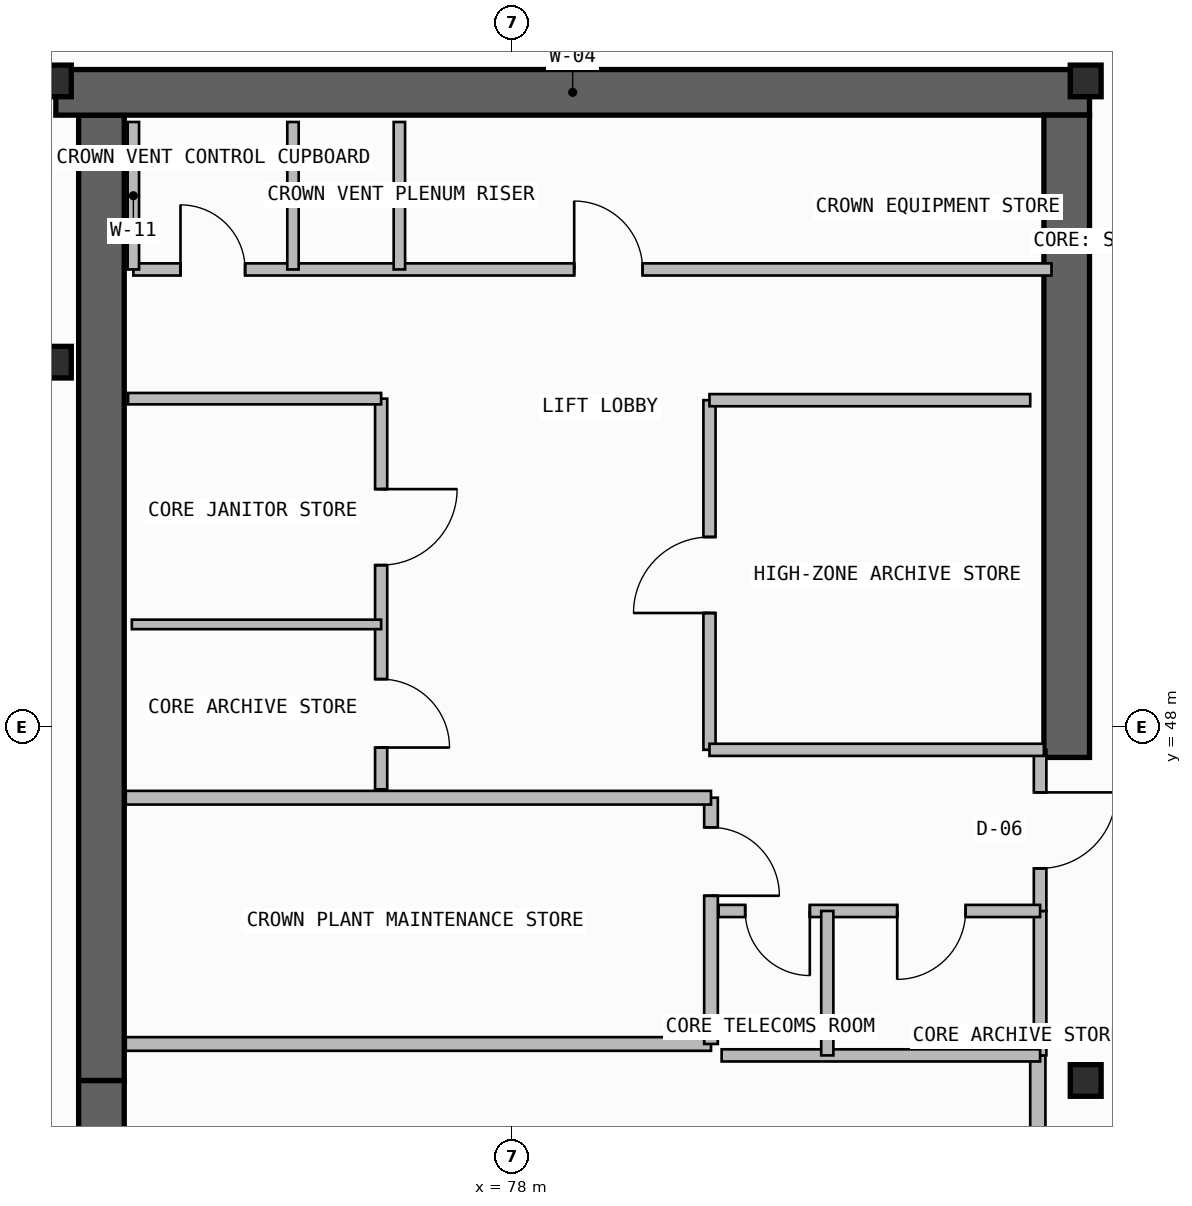
"""IFC4 building model, lengths in metres.
Left out: names, types, materials, properties, quantities, classifications, styles, units other than length and angle.
Written with IfcOpenShell. Run it as: python <this file> out.ifc"""

import sys

from ifc_helpers import new_model, si_unit, direction, frame, frame_2d, origin, origin_2d, place, context, subcontext, project, spatial, rectangle, i_section, extrude, element, fill, save


model = new_model("IFC4")
c1 = context("Model", 3, precision=1e-05, world=origin(), true_north=direction((0.0, 1.0)))
c2 = subcontext(c1, "Body", "Model", "MODEL_VIEW")
j1 = project(units=[si_unit("LENGTHUNIT", "METRE"), si_unit("PLANEANGLEUNIT", "RADIAN")], contexts=[c1])
p1 = place(None, origin())
s1 = spatial("IfcSite", under=j1, at=p1, CompositionType="ELEMENT")
p2 = place(p1, origin())
s2 = spatial("IfcBuilding", under=s1, at=p2, CompositionType="ELEMENT")
p3 = place(p2, frame((0.0, 0.0, 302.98)))
s3 = spatial("IfcBuildingStorey", under=s2, at=p3, CompositionType="ELEMENT", Elevation=302.98)
p4 = place(p3, frame((72.6, 35.5, -0.2), z_axis=(0.0, 0.0, 1.0), x_axis=(0.0, 1.0, 0.0)))
e1 = element("IfcWall", 1, at=p4, inside=s3, PredefinedType="SHEAR", context=c2, shape_type="SweptSolid", body=[
    extrude(rectangle(XDim=7.85, YDim=0.6, at=frame_2d((3.925, 0.0))), origin(), (0.0, 0.0, 1.0), 4.8),
])
p5 = place(p4, frame((1.45, 0.0, 0.2)))
e2 = element("IfcOpeningElement", 2, at=p5, cuts=e1, PredefinedType="OPENING", context=c2, shape_type="SweptSolid", body=[
    extrude(rectangle(XDim=1.2, YDim=2.2, at=frame_2d((0.6, 1.1))), frame((0.0, 0.31, 0.0), z_axis=(0.0, -1.0, 0.0), x_axis=(1.0, 0.0, 0.0)), (0.0, 0.0, 1.0), 0.62),
])
p6 = place(p3, frame((72.6, 43.35, -0.2), z_axis=(0.0, 0.0, 1.0), x_axis=(0.0, 1.0, 0.0)))
e3 = element("IfcWall", 3, at=p6, inside=s3, PredefinedType="SHEAR", context=c2, shape_type="SweptSolid", body=[
    extrude(rectangle(XDim=12.7, YDim=0.6, at=frame_2d((6.35, 0.0))), origin(), (0.0, 0.0, 1.0), 4.8),
])
p7 = place(p3, frame((72.0, 56.35, -0.2), z_axis=(0.0, 0.0, 1.0), x_axis=(1.0, 0.0, 0.0)))
e4 = element("IfcWall", 4, at=p7, inside=s3, PredefinedType="SHEAR", context=c2, shape_type="SweptSolid", body=[
    extrude(rectangle(XDim=13.6, YDim=0.6, at=frame_2d((6.8, 0.0))), origin(), (0.0, 0.0, 1.0), 4.8),
])
p8 = place(p3, frame((85.3, 47.6, -0.2), z_axis=(0.0, 0.0, 1.0), x_axis=(0.0, 1.0, 0.0)))
e5 = element("IfcWall", 5, at=p8, inside=s3, PredefinedType="SHEAR", context=c2, shape_type="SweptSolid", body=[
    extrude(rectangle(XDim=8.45, YDim=0.6, at=frame_2d((4.225, 0.0))), origin(), (0.0, 0.0, 1.0), 4.8),
])
for number, where, z_axis, x_axis in (
    (6, (85.55, 43.35, 0.0), (0.0, 0.0, 1.0), (1.0, 0.0, 0.0)),
    (7, (72.0, 52.8, 0.0), (0.0, 0.0, 1.0), (1.0, 0.0, 0.0)),
    (8, (72.0, 56.5, 0.0), (0.0, 0.0, 1.0), (1.0, 0.0, 0.0)),
    (9, (85.55, 56.5, 0.0), (0.0, 0.0, 1.0), (1.0, 0.0, 0.0)),
):
    element("IfcColumn", number, at=place(p3, frame(where, z_axis=z_axis, x_axis=x_axis)), inside=s3, PredefinedType="COLUMN", context=c2, shape_type="SweptSolid", body=[
        extrude(i_section(OverallWidth=0.406, OverallDepth=0.416, WebThickness=0.03, FlangeThickness=0.048, FilletRadius=0.015, at=origin_2d()), origin(), (0.0, 0.0, 1.0), 4.8),
    ])
p9 = place(p3, frame((84.92, 38.85, 0.0), z_axis=(0.0, 0.0, 1.0), x_axis=(0.0, 1.0, 0.0)))
e10 = element("IfcWall", 10, at=p9, inside=s3, PredefinedType="SOLIDWALL", context=c2, shape_type="SweptSolid", body=[
    extrude(rectangle(XDim=4.83, YDim=0.2, at=frame_2d((2.415, 0.0))), origin(), (0.0, 0.0, 1.0), 4.6),
])
p10 = place(p9, frame((1.25, 0.0, 0.0)))
e11 = element("IfcOpeningElement", 11, at=p10, cuts=e10, PredefinedType="OPENING", context=c2, shape_type="SweptSolid", body=[
    extrude(rectangle(XDim=1.1, YDim=2.2, at=frame_2d((0.55, 1.1))), frame((0.0, 0.11, 0.0), z_axis=(0.0, -1.0, 0.0), x_axis=(1.0, 0.0, 0.0)), (0.0, 0.0, 1.0), 0.22),
])
p11 = place(p3, frame((72.92, 43.83, 0.0), z_axis=(0.0, 0.0, 1.0), x_axis=(1.0, 0.0, 0.0)))
e12 = element("IfcWall", 12, at=p11, inside=s3, PredefinedType="PLUMBINGWALL", context=c2, shape_type="SweptSolid", body=[
    extrude(rectangle(XDim=7.7, YDim=0.18, at=frame_2d((3.85, 0.0))), origin(), (0.0, 0.0, 1.0), 4.6),
])
p12 = place(p3, frame((80.62, 43.83, 0.0), z_axis=(0.0, 0.0, 1.0), x_axis=(0.0, 1.0, 0.0)))
e13 = element("IfcWall", 13, at=p12, inside=s3, PredefinedType="PLUMBINGWALL", context=c2, shape_type="SweptSolid", body=[
    extrude(rectangle(XDim=3.24, YDim=0.18, at=frame_2d((1.62, 0.0))), origin(), (0.0, 0.0, 1.0), 4.6),
])
p13 = place(p12, frame((1.95, 0.0, 0.0)))
e14 = element("IfcOpeningElement", 14, at=p13, cuts=e13, PredefinedType="OPENING", context=c2, shape_type="SweptSolid", body=[
    extrude(rectangle(XDim=0.9, YDim=2.1, at=frame_2d((0.45, 1.05))), frame((0.0, 0.1, 0.0), z_axis=(0.0, -1.0, 0.0), x_axis=(1.0, 0.0, 0.0)), (0.0, 0.0, 1.0), 0.2),
])
p14 = place(p3, frame((72.92, 47.07, 0.0), z_axis=(0.0, 0.0, 1.0), x_axis=(1.0, 0.0, 0.0)))
e15 = element("IfcWall", 15, at=p14, inside=s3, PredefinedType="PLUMBINGWALL", context=c2, shape_type="SweptSolid", body=[
    extrude(rectangle(XDim=7.7, YDim=0.18, at=frame_2d((3.85, 0.0))), origin(), (0.0, 0.0, 1.0), 4.6),
])
p15 = place(p3, frame((84.95, 43.68, 0.0), z_axis=(0.0, 0.0, 1.0), x_axis=(0.0, 1.0, 0.0)))
e16 = element("IfcWall", 16, at=p15, inside=s3, PredefinedType="PLUMBINGWALL", context=c2, shape_type="SweptSolid", body=[
    extrude(rectangle(XDim=1.9, YDim=0.165, at=frame_2d((0.95, 0.0))), origin(), (0.0, 0.0, 1.0), 4.6),
])
p16 = place(p3, frame((84.95, 45.58, 0.0), z_axis=(0.0, 0.0, 1.0), x_axis=(0.0, 1.0, 0.0)))
e17 = element("IfcWall", 17, at=p16, inside=s3, PredefinedType="PARTITIONING", context=c2, shape_type="SweptSolid", body=[
    extrude(rectangle(XDim=2.12, YDim=0.165, at=frame_2d((1.06, 0.0))), origin(), (0.0, 0.0, 1.0), 4.6),
])
p17 = place(p16, frame((0.56, 0.0, 0.0)))
e18 = element("IfcOpeningElement", 18, at=p17, cuts=e17, PredefinedType="OPENING", context=c2, shape_type="SweptSolid", body=[
    extrude(rectangle(XDim=1.0, YDim=2.2, at=frame_2d((0.5, 1.1))), frame((0.0, 0.093, 0.0), z_axis=(0.0, -1.0, 0.0), x_axis=(1.0, 0.0, 0.0)), (0.0, 0.0, 1.0), 0.185),
])
p18 = place(p3, frame((80.72, 45.58, 0.0), z_axis=(0.0, 0.0, 1.0), x_axis=(1.0, 0.0, 0.0)))
e19 = element("IfcWall", 19, at=p18, inside=s3, PredefinedType="PLUMBINGWALL", context=c2, shape_type="SweptSolid", body=[
    extrude(rectangle(XDim=4.23, YDim=0.16, at=frame_2d((2.115, 0.0))), origin(), (0.0, 0.0, 1.0), 4.6),
])
p19 = place(p18, frame((0.35, 0.0, 0.0)))
e20 = element("IfcOpeningElement", 20, at=p19, cuts=e19, PredefinedType="OPENING", context=c2, shape_type="SweptSolid", body=[
    extrude(rectangle(XDim=0.85, YDim=2.05, at=frame_2d((0.425, 1.025))), frame((0.0, 0.09, 0.0), z_axis=(0.0, -1.0, 0.0), x_axis=(1.0, 0.0, 0.0)), (0.0, 0.0, 1.0), 0.18),
])
p20 = place(p18, frame((2.35, 0.0, 0.0)))
e21 = element("IfcOpeningElement", 21, at=p20, cuts=e19, PredefinedType="OPENING", context=c2, shape_type="SweptSolid", body=[
    extrude(rectangle(XDim=0.9, YDim=2.1, at=frame_2d((0.45, 1.05))), frame((0.0, 0.09, 0.0), z_axis=(0.0, -1.0, 0.0), x_axis=(1.0, 0.0, 0.0)), (0.0, 0.0, 1.0), 0.18),
])
p21 = place(p3, frame((80.76, 43.68, 0.0), z_axis=(0.0, 0.0, 1.0), x_axis=(1.0, 0.0, 0.0)))
e22 = element("IfcWall", 22, at=p21, inside=s3, PredefinedType="PLUMBINGWALL", context=c2, shape_type="SweptSolid", body=[
    extrude(rectangle(XDim=4.19, YDim=0.16, at=frame_2d((2.095, 0.0))), origin(), (0.0, 0.0, 1.0), 4.6),
])
p22 = place(p3, frame((82.15, 43.68, 0.0), z_axis=(0.0, 0.0, 1.0), x_axis=(0.0, 1.0, 0.0)))
e23 = element("IfcWall", 23, at=p22, inside=s3, PredefinedType="PLUMBINGWALL", context=c2, shape_type="SweptSolid", body=[
    extrude(rectangle(XDim=1.9, YDim=0.16, at=frame_2d((0.95, 0.0))), origin(), (0.0, 0.0, 1.0), 4.6),
])
p23 = place(p3, frame((76.28, 47.18, 0.0), z_axis=(0.0, 0.0, 1.0), x_axis=(0.0, 1.0, 0.0)))
e24 = element("IfcWall", 24, at=p23, inside=s3, PredefinedType="SOLIDWALL", context=c2, shape_type="SweptSolid", body=[
    extrude(rectangle(XDim=5.14, YDim=0.16, at=frame_2d((2.57, 0.0))), origin(), (0.0, 0.0, 1.0), 4.6),
])
p24 = place(p23, frame((0.55, 0.0, 0.0)))
e25 = element("IfcOpeningElement", 25, at=p24, cuts=e24, PredefinedType="OPENING", context=c2, shape_type="SweptSolid", body=[
    extrude(rectangle(XDim=0.9, YDim=2.1, at=frame_2d((0.45, 1.05))), frame((0.0, 0.09, 0.0), z_axis=(0.0, -1.0, 0.0), x_axis=(1.0, 0.0, 0.0)), (0.0, 0.0, 1.0), 0.18),
])
p25 = place(p23, frame((2.95, 0.0, 0.0)))
e26 = element("IfcOpeningElement", 26, at=p25, cuts=e24, PredefinedType="OPENING", context=c2, shape_type="SweptSolid", body=[
    extrude(rectangle(XDim=1.0, YDim=2.2, at=frame_2d((0.5, 1.1))), frame((0.0, 0.09, 0.0), z_axis=(0.0, -1.0, 0.0), x_axis=(1.0, 0.0, 0.0)), (0.0, 0.0, 1.0), 0.18),
])
p26 = place(p3, frame((72.95, 52.32, 0.0), z_axis=(0.0, 0.0, 1.0), x_axis=(1.0, 0.0, 0.0)))
e27 = element("IfcWall", 27, at=p26, inside=s3, PredefinedType="SOLIDWALL", context=c2, shape_type="SweptSolid", body=[
    extrude(rectangle(XDim=3.33, YDim=0.15, at=frame_2d((1.665, 0.0))), origin(), (0.0, 0.0, 1.0), 4.6),
])
p27 = place(p3, frame((73.0, 49.35, 0.0), z_axis=(0.0, 0.0, 1.0), x_axis=(1.0, 0.0, 0.0)))
e28 = element("IfcWall", 28, at=p27, inside=s3, PredefinedType="PARTITIONING", context=c2, shape_type="SweptSolid", body=[
    extrude(rectangle(XDim=3.28, YDim=0.125, at=frame_2d((1.64, 0.0))), origin(), (0.0, 0.0, 1.0), 4.6),
])
p28 = place(p3, frame((80.6, 47.7, 0.0), z_axis=(0.0, 0.0, 1.0), x_axis=(0.0, 1.0, 0.0)))
e29 = element("IfcWall", 29, at=p28, inside=s3, PredefinedType="SOLIDWALL", context=c2, shape_type="SweptSolid", body=[
    extrude(rectangle(XDim=4.6, YDim=0.16, at=frame_2d((2.3, 0.0))), origin(), (0.0, 0.0, 1.0), 4.6),
])
p29 = place(p28, frame((1.8, 0.0, 0.0)))
e30 = element("IfcOpeningElement", 30, at=p29, cuts=e29, PredefinedType="OPENING", context=c2, shape_type="SweptSolid", body=[
    extrude(rectangle(XDim=1.0, YDim=2.2, at=frame_2d((0.5, 1.1))), frame((0.0, 0.09, 0.0), z_axis=(0.0, -1.0, 0.0), x_axis=(1.0, 0.0, 0.0)), (0.0, 0.0, 1.0), 0.18),
])
p30 = place(p3, frame((80.6, 47.7, 0.0), z_axis=(0.0, 0.0, 1.0), x_axis=(1.0, 0.0, 0.0)))
e31 = element("IfcWall", 31, at=p30, inside=s3, PredefinedType="SOLIDWALL", context=c2, shape_type="SweptSolid", body=[
    extrude(rectangle(XDim=4.4, YDim=0.16, at=frame_2d((2.2, 0.0))), origin(), (0.0, 0.0, 1.0), 4.6),
])
p31 = place(p3, frame((80.6, 52.3, 0.0), z_axis=(0.0, 0.0, 1.0), x_axis=(1.0, 0.0, 0.0)))
e32 = element("IfcWall", 32, at=p31, inside=s3, PredefinedType="SOLIDWALL", context=c2, shape_type="SweptSolid", body=[
    extrude(rectangle(XDim=4.22, YDim=0.16, at=frame_2d((2.11, 0.0))), origin(), (0.0, 0.0, 1.0), 4.6),
])
p32 = place(p3, frame((73.02, 54.02, 0.0), z_axis=(0.0, 0.0, 1.0), x_axis=(1.0, 0.0, 0.0)))
e33 = element("IfcWall", 33, at=p32, inside=s3, PredefinedType="SOLIDWALL", context=c2, shape_type="SweptSolid", body=[
    extrude(rectangle(XDim=12.08, YDim=0.16, at=frame_2d((6.04, 0.0))), origin(), (0.0, 0.0, 1.0), 4.6),
])
p33 = place(p32, frame((0.62, 0.0, 0.0)))
e34 = element("IfcOpeningElement", 34, at=p33, cuts=e33, PredefinedType="OPENING", context=c2, shape_type="SweptSolid", body=[
    extrude(rectangle(XDim=0.85, YDim=2.05, at=frame_2d((0.425, 1.025))), frame((0.0, 0.09, 0.0), z_axis=(0.0, -1.0, 0.0), x_axis=(1.0, 0.0, 0.0)), (0.0, 0.0, 1.0), 0.18),
])
p34 = place(p32, frame((5.8, 0.0, 0.0)))
e35 = element("IfcOpeningElement", 35, at=p34, cuts=e33, PredefinedType="OPENING", context=c2, shape_type="SweptSolid", body=[
    extrude(rectangle(XDim=0.9, YDim=2.1, at=frame_2d((0.45, 1.05))), frame((0.0, 0.09, 0.0), z_axis=(0.0, -1.0, 0.0), x_axis=(1.0, 0.0, 0.0)), (0.0, 0.0, 1.0), 0.18),
])
for number, where, z_axis, x_axis in (
    (36, (73.02, 54.02, 0.0), (0.0, 0.0, 1.0), (0.0, 1.0, 0.0)),
    (37, (75.12, 54.02, 0.0), (0.0, 0.0, 1.0), (0.0, 1.0, 0.0)),
    (38, (76.52, 54.02, 0.0), (0.0, 0.0, 1.0), (0.0, 1.0, 0.0)),
):
    element("IfcWall", number, at=place(p3, frame(where, z_axis=z_axis, x_axis=x_axis)), inside=s3, PredefinedType="PLUMBINGWALL", context=c2, shape_type="SweptSolid", body=[
        extrude(rectangle(XDim=1.94, YDim=0.15, at=frame_2d((0.97, 0.0))), origin(), (0.0, 0.0, 1.0), 4.6),
    ])
p35 = place(p13, frame((0.9, 0.0, 0.0), z_axis=(0.0, 0.0, 1.0), x_axis=(-1.0, 0.0, 0.0)))
e39 = element("IfcDoor", 39, at=p35, inside=s3, OperationType="SINGLE_SWING_RIGHT", PredefinedType="DOOR", context=c2, shape_type="SweptSolid", body=[
    extrude(rectangle(XDim=0.9, YDim=2.1, at=frame_2d((0.45, 1.05))), frame((0.0, 0.025, 0.0), z_axis=(0.0, -1.0, 0.0), x_axis=(1.0, 0.0, 0.0)), (0.0, 0.0, 1.0), 0.05),
])
fill(e14, e39)
p36 = place(p17, frame((1.0, 0.0, 0.0), z_axis=(0.0, 0.0, 1.0), x_axis=(-1.0, 0.0, 0.0)))
e40 = element("IfcDoor", 40, at=p36, inside=s3, OperationType="SINGLE_SWING_LEFT", PredefinedType="DOOR", context=c2, shape_type="SweptSolid", body=[
    extrude(rectangle(XDim=1.0, YDim=2.2, at=frame_2d((0.5, 1.1))), frame((0.0, 0.025, 0.0), z_axis=(0.0, -1.0, 0.0), x_axis=(1.0, 0.0, 0.0)), (0.0, 0.0, 1.0), 0.05),
])
fill(e18, e40)
p37 = place(p19, frame((0.85, 0.0, 0.0), z_axis=(0.0, 0.0, 1.0), x_axis=(-1.0, 0.0, 0.0)))
e41 = element("IfcDoor", 41, at=p37, inside=s3, OperationType="SINGLE_SWING_LEFT", PredefinedType="DOOR", context=c2, shape_type="SweptSolid", body=[
    extrude(rectangle(XDim=0.85, YDim=2.05, at=frame_2d((0.425, 1.025))), frame((0.0, 0.025, 0.0), z_axis=(0.0, -1.0, 0.0), x_axis=(1.0, 0.0, 0.0)), (0.0, 0.0, 1.0), 0.05),
])
fill(e20, e41)
p38 = place(p20, frame((0.9, 0.0, 0.0), z_axis=(0.0, 0.0, 1.0), x_axis=(-1.0, 0.0, 0.0)))
e42 = element("IfcDoor", 42, at=p38, inside=s3, OperationType="SINGLE_SWING_RIGHT", PredefinedType="DOOR", context=c2, shape_type="SweptSolid", body=[
    extrude(rectangle(XDim=0.9, YDim=2.1, at=frame_2d((0.45, 1.05))), frame((0.0, 0.025, 0.0), z_axis=(0.0, -1.0, 0.0), x_axis=(1.0, 0.0, 0.0)), (0.0, 0.0, 1.0), 0.05),
])
fill(e21, e42)
p39 = place(p24, frame((0.9, 0.0, 0.0), z_axis=(0.0, 0.0, 1.0), x_axis=(-1.0, 0.0, 0.0)))
e43 = element("IfcDoor", 43, at=p39, inside=s3, OperationType="SINGLE_SWING_RIGHT", PredefinedType="DOOR", context=c2, shape_type="SweptSolid", body=[
    extrude(rectangle(XDim=0.9, YDim=2.1, at=frame_2d((0.45, 1.05))), frame((0.0, 0.025, 0.0), z_axis=(0.0, -1.0, 0.0), x_axis=(1.0, 0.0, 0.0)), (0.0, 0.0, 1.0), 0.05),
])
fill(e25, e43)
p40 = place(p25, frame((1.0, 0.0, 0.0), z_axis=(0.0, 0.0, 1.0), x_axis=(-1.0, 0.0, 0.0)))
e44 = element("IfcDoor", 44, at=p40, inside=s3, OperationType="SINGLE_SWING_LEFT", PredefinedType="DOOR", context=c2, shape_type="SweptSolid", body=[
    extrude(rectangle(XDim=1.0, YDim=2.2, at=frame_2d((0.5, 1.1))), frame((0.0, 0.025, 0.0), z_axis=(0.0, -1.0, 0.0), x_axis=(1.0, 0.0, 0.0)), (0.0, 0.0, 1.0), 0.05),
])
fill(e26, e44)
p41 = place(p29, origin())
e45 = element("IfcDoor", 45, at=p41, inside=s3, OperationType="SINGLE_SWING_LEFT", PredefinedType="DOOR", context=c2, shape_type="SweptSolid", body=[
    extrude(rectangle(XDim=1.0, YDim=2.2, at=frame_2d((0.5, 1.1))), frame((0.0, 0.025, 0.0), z_axis=(0.0, -1.0, 0.0), x_axis=(1.0, 0.0, 0.0)), (0.0, 0.0, 1.0), 0.05),
])
fill(e30, e45)
p42 = place(p33, origin())
e46 = element("IfcDoor", 46, at=p42, inside=s3, OperationType="SINGLE_SWING_LEFT", PredefinedType="DOOR", context=c2, shape_type="SweptSolid", body=[
    extrude(rectangle(XDim=0.85, YDim=2.05, at=frame_2d((0.425, 1.025))), frame((0.0, 0.025, 0.0), z_axis=(0.0, -1.0, 0.0), x_axis=(1.0, 0.0, 0.0)), (0.0, 0.0, 1.0), 0.05),
])
fill(e34, e46)
p43 = place(p34, origin())
e47 = element("IfcDoor", 47, at=p43, inside=s3, OperationType="SINGLE_SWING_LEFT", PredefinedType="DOOR", context=c2, shape_type="SweptSolid", body=[
    extrude(rectangle(XDim=0.9, YDim=2.1, at=frame_2d((0.45, 1.05))), frame((0.0, 0.025, 0.0), z_axis=(0.0, -1.0, 0.0), x_axis=(1.0, 0.0, 0.0)), (0.0, 0.0, 1.0), 0.05),
])
fill(e35, e47)
save(model, sys.argv[1])
